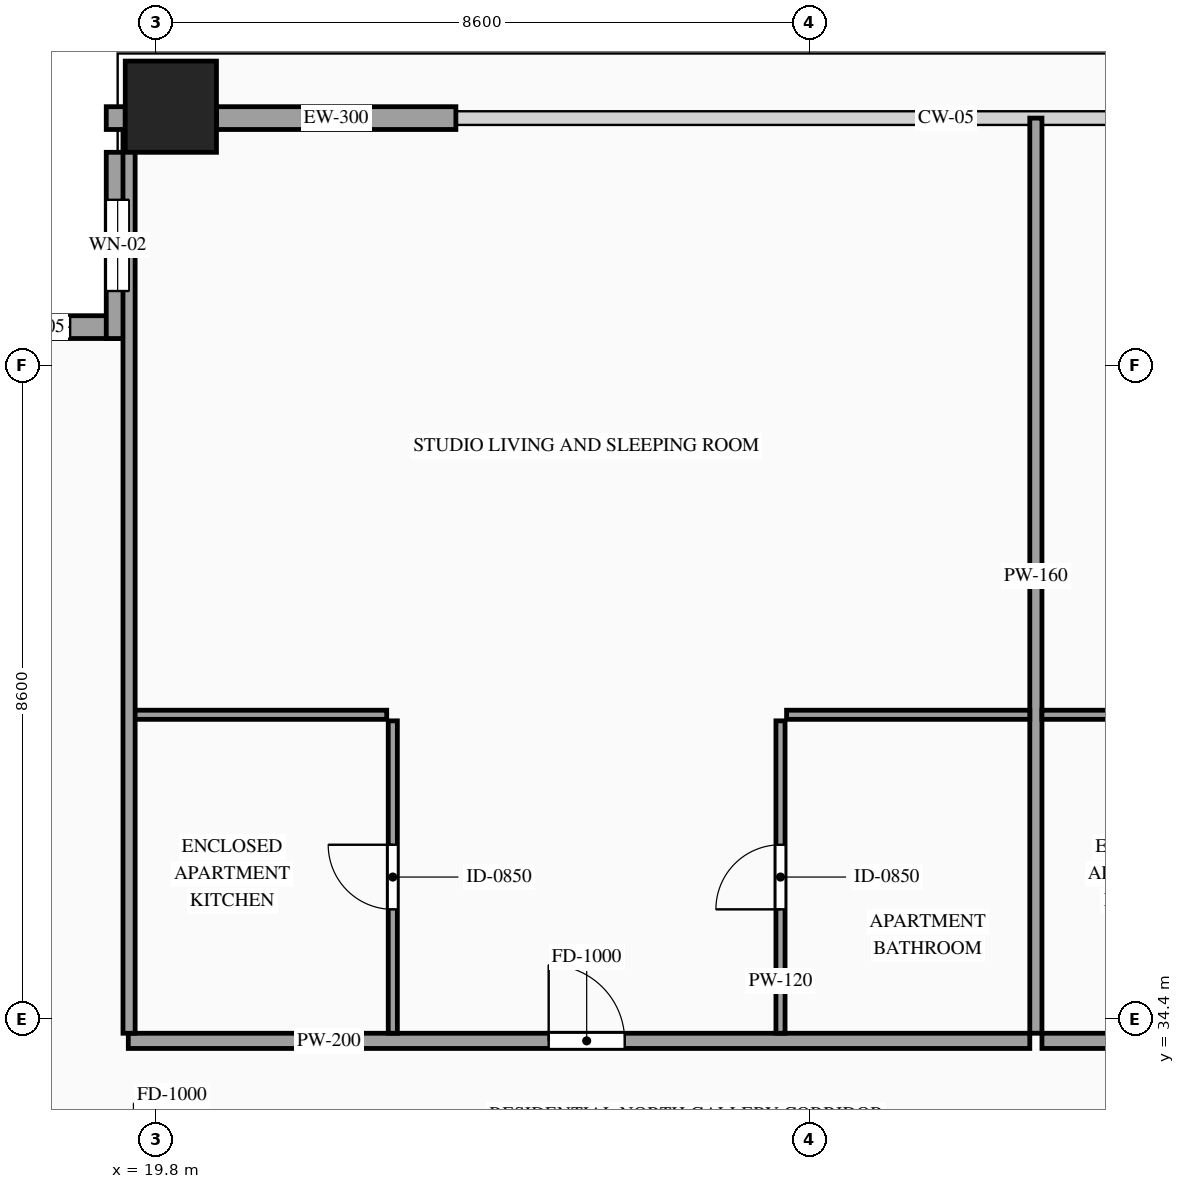
"""IFC4 building model, lengths in metres.
Left out: names, types, materials, properties, quantities, classifications, styles, units other than length and angle.
Written with IfcOpenShell. Run it as: python <this file> out.ifc"""

import sys

from ifc_helpers import new_model, si_unit, direction, frame, frame_2d, origin, origin_2d, place, context, subcontext, project, spatial, rectangle, hollow_rectangle, extrude, source, transform, mapped, element, fill, save


model = new_model("IFC4")
c1 = context("Model", 3, precision=1e-05, world=origin(), true_north=direction((0.0, 1.0)))
c2 = subcontext(c1, "Body", "Model", "MODEL_VIEW")
j1 = project(units=[si_unit("LENGTHUNIT", "METRE"), si_unit("PLANEANGLEUNIT", "RADIAN")], contexts=[c1])
p1 = place(None, origin())
s1 = spatial("IfcSite", under=j1, at=p1, CompositionType="ELEMENT")
p2 = place(p1, origin())
s2 = spatial("IfcBuilding", under=s1, at=p2, CompositionType="ELEMENT")
p3 = place(p2, frame((0.0, 0.0, 238.1)))
s3 = spatial("IfcBuildingStorey", under=s2, at=p3, CompositionType="ELEMENT", Elevation=238.1)
m1 = source(origin(), c2, "Body", "SweptSolid", [
    extrude(hollow_rectangle(XDim=1.2, YDim=1.2, WallThickness=0.055, at=origin_2d()), origin(), (0.0, 0.0, 1.0), 3.5),
])
p4 = place(p3, frame((20.0, 46.4, 0.0), z_axis=(0.0, 0.0, 1.0), x_axis=(1.0, 0.0, 0.0)))
e1 = element("IfcColumn", 1, at=p4, inside=s3, PredefinedType="COLUMN", context=c2, shape_type="MappedRepresentation", body=[
    mapped(m1, transform((0.0, 0.0, 0.0), scale=1.0)),
])
p5 = place(p3, frame((19.45, 43.5, 0.0), z_axis=(0.0, 0.0, 1.0), x_axis=(-1.0, 0.0, 0.0)))
e2 = element("IfcWall", 2, at=p5, inside=s3, PredefinedType="SOLIDWALL", context=c2, shape_type="SweptSolid", body=[
    extrude(rectangle(XDim=2.45, YDim=0.3, at=frame_2d((1.225, 0.0))), origin(), (0.0, 0.0, 1.0), 3.28),
])
p6 = place(p5, frame((0.775, 0.0, 0.85)))
e3 = element("IfcOpeningElement", 3, at=p6, cuts=e2, PredefinedType="OPENING", context=c2, shape_type="SweptSolid", body=[
    extrude(rectangle(XDim=0.9, YDim=1.5, at=frame_2d((0.45, 0.75))), frame((0.0, 0.165, 0.0), z_axis=(0.0, -1.0, 0.0), x_axis=(1.0, 0.0, 0.0)), (0.0, 0.0, 1.0), 0.33),
])
p7 = place(p3, frame((19.3, 45.8, 0.0), z_axis=(0.0, 0.0, 1.0), x_axis=(0.0, -1.0, 0.0)))
e4 = element("IfcWall", 4, at=p7, inside=s3, PredefinedType="SOLIDWALL", context=c2, shape_type="SweptSolid", body=[
    extrude(rectangle(XDim=2.45, YDim=0.3, at=frame_2d((1.225, 0.0))), origin(), (0.0, 0.0, 1.0), 3.28),
])
p8 = place(p7, frame((0.625, 0.0, 0.85)))
e5 = element("IfcOpeningElement", 5, at=p8, cuts=e4, PredefinedType="OPENING", context=c2, shape_type="SweptSolid", body=[
    extrude(rectangle(XDim=1.2, YDim=2.1, at=frame_2d((0.6, 1.05))), frame((0.0, 0.165, 0.0), z_axis=(0.0, -1.0, 0.0), x_axis=(1.0, 0.0, 0.0)), (0.0, 0.0, 1.0), 0.33),
])
m2 = source(origin(), c2, "Body", "SweptSolid", [
    extrude(rectangle(XDim=0.25, YDim=0.3, at=frame_2d((0.125, 0.0))), origin(), (0.0, 0.0, 1.0), 3.28),
])
p9 = place(p3, frame((19.15, 46.25, 0.0), z_axis=(0.0, 0.0, 1.0), x_axis=(1.0, 0.0, 0.0)))
e6 = element("IfcWall", 6, at=p9, inside=s3, PredefinedType="SOLIDWALL", context=c2, shape_type="MappedRepresentation", body=[
    mapped(m2, transform((0.0, 0.0, 0.0), scale=1.0)),
])
m3 = source(origin(), c2, "Body", "SweptSolid", [
    extrude(rectangle(XDim=3.15, YDim=0.3, at=frame_2d((1.575, 0.0))), origin(), (0.0, 0.0, 1.0), 2.835),
])
p10 = place(p3, frame((20.6, 46.25, 0.0), z_axis=(0.0, 0.0, 1.0), x_axis=(1.0, 0.0, 0.0)))
e7 = element("IfcWall", 7, at=p10, inside=s3, PredefinedType="SOLIDWALL", context=c2, shape_type="MappedRepresentation", body=[
    mapped(m3, transform((0.0, 0.0, 0.0), scale=1.0)),
])
p11 = place(p3, frame((19.44, 34.11, 0.0), z_axis=(0.0, 0.0, 1.0), x_axis=(1.0, 0.0, 0.0)))
e8 = element("IfcWall", 8, at=p11, inside=s3, PredefinedType="PARTITIONING", context=c2, shape_type="SweptSolid", body=[
    extrude(rectangle(XDim=11.861, YDim=0.2, at=frame_2d((5.931, 0.0))), origin(), (0.0, 0.0, 1.0), 3.28),
])
p12 = place(p11, frame((5.531, 0.0, 0.0)))
e9 = element("IfcOpeningElement", 9, at=p12, cuts=e8, PredefinedType="OPENING", context=c2, shape_type="SweptSolid", body=[
    extrude(rectangle(XDim=1.0, YDim=2.2, at=frame_2d((0.5, 1.1))), frame((0.0, 0.115, 0.0), z_axis=(0.0, -1.0, 0.0), x_axis=(1.0, 0.0, 0.0)), (0.0, 0.0, 1.0), 0.23),
])
m4 = source(origin(), c2, "Body", "SweptSolid", [
    extrude(rectangle(XDim=12.04, YDim=0.16, at=frame_2d((6.02, 0.0))), origin(), (0.0, 0.0, 1.0), 3.28),
])
p13 = place(p3, frame((31.381, 34.21, 0.0), z_axis=(0.0, 0.0, 1.0), x_axis=(0.0, 1.0, 0.0)))
e10 = element("IfcWall", 10, at=p13, inside=s3, PredefinedType="PARTITIONING", context=c2, shape_type="MappedRepresentation", body=[
    mapped(m4, transform((0.0, 0.0, 0.0), scale=1.0)),
])
m5 = source(origin(), c2, "Body", "SweptSolid", [
    extrude(rectangle(XDim=3.4, YDim=0.12, at=frame_2d((1.7, 0.0))), origin(), (0.0, 0.0, 1.0), 3.28),
])
p14 = place(p3, frame((19.44, 38.4, 0.0), z_axis=(0.0, 0.0, 1.0), x_axis=(1.0, 0.0, 0.0)))
e11 = element("IfcWall", 11, at=p14, inside=s3, PredefinedType="PARTITIONING", context=c2, shape_type="MappedRepresentation", body=[
    mapped(m5, transform((0.0, 0.0, 0.0), scale=1.0)),
])
p15 = place(p3, frame((22.92, 34.21, 0.0), z_axis=(0.0, 0.0, 1.0), x_axis=(0.0, 1.0, 0.0)))
e12 = element("IfcWall", 12, at=p15, inside=s3, PredefinedType="PARTITIONING", context=c2, shape_type="SweptSolid", body=[
    extrude(rectangle(XDim=4.11, YDim=0.12, at=frame_2d((2.055, 0.0))), origin(), (0.0, 0.0, 1.0), 3.28),
])
p16 = place(p15, frame((1.63, 0.0, 0.0)))
e13 = element("IfcOpeningElement", 13, at=p16, cuts=e12, PredefinedType="OPENING", context=c2, shape_type="SweptSolid", body=[
    extrude(rectangle(XDim=0.85, YDim=2.1, at=frame_2d((0.425, 1.05))), frame((0.0, 0.075, 0.0), z_axis=(0.0, -1.0, 0.0), x_axis=(1.0, 0.0, 0.0)), (0.0, 0.0, 1.0), 0.15),
])
m6 = source(origin(), c2, "Body", "SweptSolid", [
    extrude(rectangle(XDim=3.2, YDim=0.12, at=frame_2d((1.6, 0.0))), origin(), (0.0, 0.0, 1.0), 3.28),
])
p17 = place(p3, frame((28.101, 38.4, 0.0), z_axis=(0.0, 0.0, 1.0), x_axis=(1.0, 0.0, 0.0)))
e14 = element("IfcWall", 14, at=p17, inside=s3, PredefinedType="PARTITIONING", context=c2, shape_type="MappedRepresentation", body=[
    mapped(m6, transform((0.0, 0.0, 0.0), scale=1.0)),
])
p18 = place(p3, frame((28.021, 34.21, 0.0), z_axis=(0.0, 0.0, 1.0), x_axis=(0.0, 1.0, 0.0)))
e15 = element("IfcWall", 15, at=p18, inside=s3, PredefinedType="PARTITIONING", context=c2, shape_type="SweptSolid", body=[
    extrude(rectangle(XDim=4.11, YDim=0.12, at=frame_2d((2.055, 0.0))), origin(), (0.0, 0.0, 1.0), 3.28),
])
p19 = place(p18, frame((1.63, 0.0, 0.0)))
e16 = element("IfcOpeningElement", 16, at=p19, cuts=e15, PredefinedType="OPENING", context=c2, shape_type="SweptSolid", body=[
    extrude(rectangle(XDim=0.85, YDim=2.1, at=frame_2d((0.425, 1.05))), frame((0.0, 0.075, 0.0), z_axis=(0.0, -1.0, 0.0), x_axis=(1.0, 0.0, 0.0)), (0.0, 0.0, 1.0), 0.15),
])
p20 = place(p3, frame((31.461, 34.11, 0.0), z_axis=(0.0, 0.0, 1.0), x_axis=(1.0, 0.0, 0.0)))
e17 = element("IfcWall", 17, at=p20, inside=s3, PredefinedType="PARTITIONING", context=c2, shape_type="SweptSolid", body=[
    extrude(rectangle(XDim=11.429, YDim=0.2, at=frame_2d((5.714, 0.0))), origin(), (0.0, 0.0, 1.0), 3.28),
])
p21 = place(p20, frame((5.314, 0.0, 0.0)))
e18 = element("IfcOpeningElement", 18, at=p21, cuts=e17, PredefinedType="OPENING", context=c2, shape_type="SweptSolid", body=[
    extrude(rectangle(XDim=1.0, YDim=2.2, at=frame_2d((0.5, 1.1))), frame((0.0, 0.115, 0.0), z_axis=(0.0, -1.0, 0.0), x_axis=(1.0, 0.0, 0.0)), (0.0, 0.0, 1.0), 0.23),
])
p22 = place(p3, frame((31.461, 38.4, 0.0), z_axis=(0.0, 0.0, 1.0), x_axis=(1.0, 0.0, 0.0)))
e19 = element("IfcWall", 19, at=p22, inside=s3, PredefinedType="PARTITIONING", context=c2, shape_type="MappedRepresentation", body=[
    mapped(m5, transform((0.0, 0.0, 0.0), scale=1.0)),
])
m7 = source(origin(), c2, "Body", "SweptSolid", [
    extrude(rectangle(XDim=11.89, YDim=0.16, at=frame_2d((5.945, 0.0))), origin(), (0.0, 0.0, 1.0), 3.28),
])
p23 = place(p3, frame((19.45, 34.21, 0.0), z_axis=(0.0, 0.0, 1.0), x_axis=(0.0, 1.0, 0.0)))
e20 = element("IfcWall", 20, at=p23, inside=s3, PredefinedType="PARTITIONING", context=c2, shape_type="MappedRepresentation", body=[
    mapped(m7, transform((0.0, 0.0, 0.0), scale=1.0)),
])
m8 = source(origin(), c2, "Body", "SweptSolid", [
    extrude(rectangle(XDim=0.9, YDim=1.5, at=frame_2d((0.45, 0.75))), frame((0.0, 0.03, 0.0), z_axis=(0.0, -1.0, 0.0), x_axis=(1.0, 0.0, 0.0)), (0.0, 0.0, 1.0), 0.06),
])
p24 = place(p6, origin())
e21 = element("IfcWindow", 21, at=p24, inside=s3, PartitioningType="SINGLE_PANEL", PredefinedType="WINDOW", context=c2, shape_type="MappedRepresentation", body=[
    mapped(m8, transform((0.0, 0.0, 0.0), scale=1.0)),
])
fill(e3, e21)
m9 = source(origin(), c2, "Body", "SweptSolid", [
    extrude(rectangle(XDim=1.2, YDim=2.1, at=frame_2d((0.6, 1.05))), frame((0.0, 0.03, 0.0), z_axis=(0.0, -1.0, 0.0), x_axis=(1.0, 0.0, 0.0)), (0.0, 0.0, 1.0), 0.06),
])
p25 = place(p8, origin())
e22 = element("IfcWindow", 22, at=p25, inside=s3, PartitioningType="SINGLE_PANEL", PredefinedType="WINDOW", context=c2, shape_type="MappedRepresentation", body=[
    mapped(m9, transform((0.0, 0.0, 0.0), scale=1.0)),
])
fill(e5, e22)
m10 = source(origin(), c2, "Body", "SweptSolid", [
    extrude(rectangle(XDim=1.0, YDim=2.2, at=frame_2d((0.5, 1.1))), frame((0.0, 0.025, 0.0), z_axis=(0.0, -1.0, 0.0), x_axis=(1.0, 0.0, 0.0)), (0.0, 0.0, 1.0), 0.05),
])
p26 = place(p12, origin())
e23 = element("IfcDoor", 23, at=p26, inside=s3, OperationType="SINGLE_SWING_LEFT", PredefinedType="DOOR", context=c2, shape_type="MappedRepresentation", body=[
    mapped(m10, transform((0.0, 0.0, 0.0), scale=1.0)),
])
fill(e9, e23)
m11 = source(origin(), c2, "Body", "SweptSolid", [
    extrude(rectangle(XDim=0.85, YDim=2.1, at=frame_2d((0.425, 1.05))), frame((0.0, 0.025, 0.0), z_axis=(0.0, -1.0, 0.0), x_axis=(1.0, 0.0, 0.0)), (0.0, 0.0, 1.0), 0.05),
])
p27 = place(p16, origin())
e24 = element("IfcDoor", 24, at=p27, inside=s3, OperationType="SINGLE_SWING_RIGHT", PredefinedType="DOOR", context=c2, shape_type="MappedRepresentation", body=[
    mapped(m11, transform((0.0, 0.0, 0.0), scale=1.0)),
])
fill(e13, e24)
p28 = place(p19, origin())
e25 = element("IfcDoor", 25, at=p28, inside=s3, OperationType="SINGLE_SWING_LEFT", PredefinedType="DOOR", context=c2, shape_type="MappedRepresentation", body=[
    mapped(m11, transform((0.0, 0.0, 0.0), scale=1.0)),
])
fill(e16, e25)
save(model, sys.argv[1])
